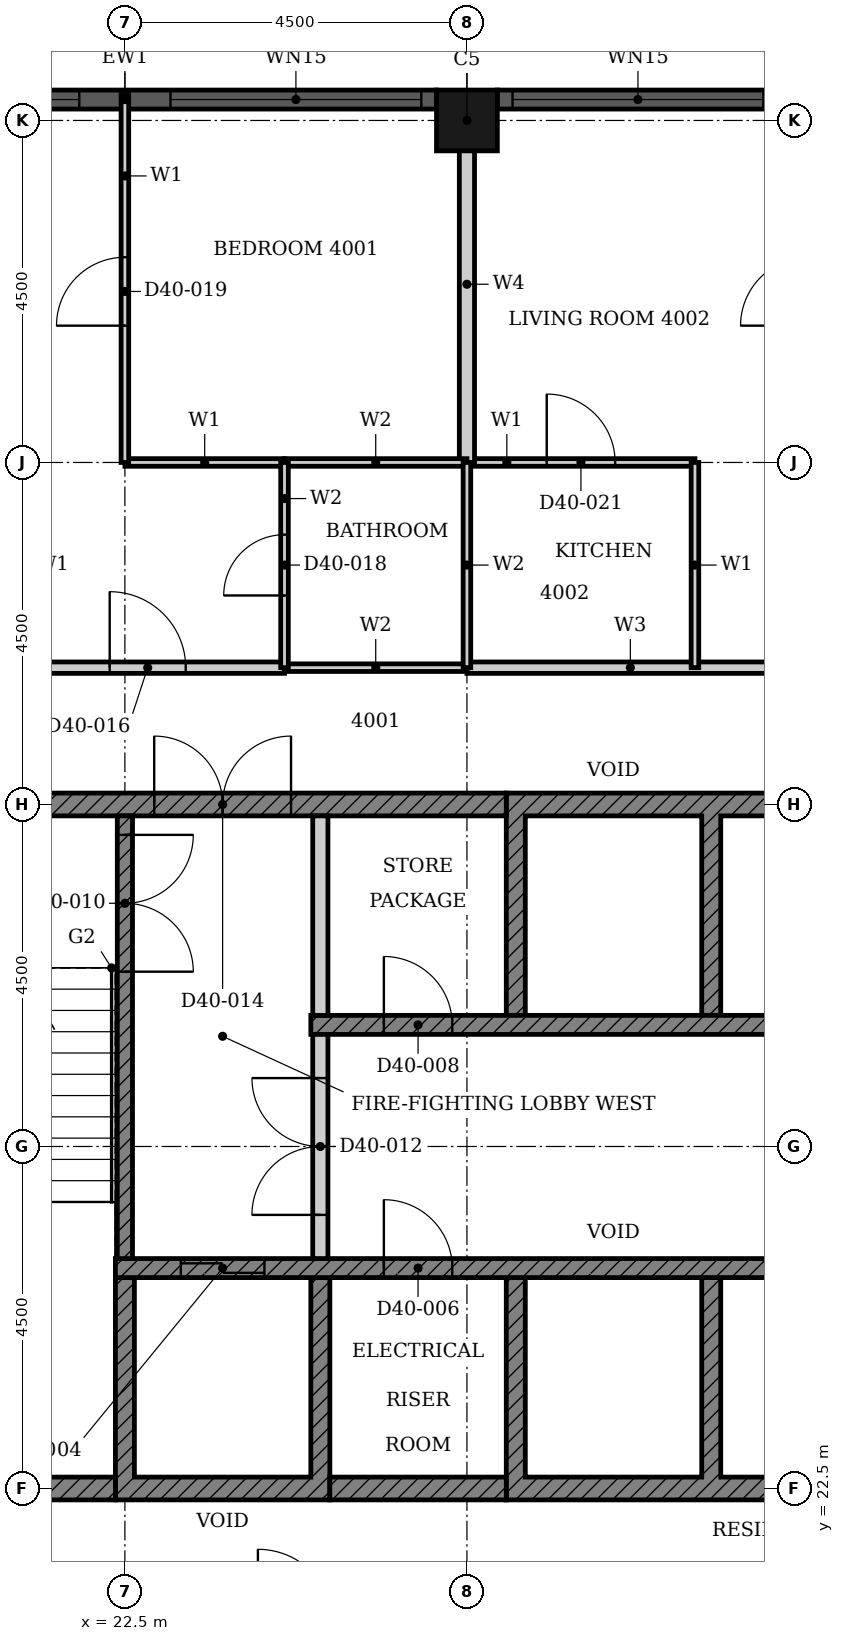
"""IFC4 building model, lengths in metres.
Left out: names, types, materials, properties, quantities, classifications, styles, units other than length and angle.
Written with IfcOpenShell. Run it as: python <this file> out.ifc"""

import sys

from ifc_helpers import new_model, si_unit, direction, frame, frame_2d, origin, origin_2d, place, context, subcontext, project, spatial, polyline, rectangle, hollow_rectangle, outline, extrude, element, fill, save


model = new_model("IFC4")
c1 = context("Model", 3, precision=1e-05, world=origin(), true_north=direction((0.0, 1.0)))
c2 = subcontext(c1, "Body", "Model", "MODEL_VIEW")
j1 = project(units=[si_unit("LENGTHUNIT", "METRE"), si_unit("PLANEANGLEUNIT", "RADIAN")], contexts=[c1])
p1 = place(None, origin())
s1 = spatial("IfcSite", under=j1, at=p1, CompositionType="ELEMENT")
p2 = place(p1, origin())
s2 = spatial("IfcBuilding", under=s1, at=p2, CompositionType="ELEMENT")
p3 = place(p2, frame((0.0, 0.0, 161.7)))
s3 = spatial("IfcBuildingStorey", under=s2, at=p3, CompositionType="ELEMENT", Elevation=161.7)
p4 = place(p3, frame((27.0, 40.5, 0.0), z_axis=(0.0, 0.0, 1.0), x_axis=(1.0, 0.0, 0.0)))
e1 = element("IfcColumn", 1, at=p4, inside=s3, PredefinedType="COLUMN", context=c2, shape_type="SweptSolid", body=[
    extrude(hollow_rectangle(XDim=0.8, YDim=0.8, WallThickness=0.025, at=origin_2d()), origin(), (0.0, 0.0, 1.0), 3.7),
])
p5 = place(p3, frame((35.6, 40.775, 0.0), z_axis=(0.0, 0.0, 1.0), x_axis=(-1.0, 0.0, 0.0)))
e2 = element("IfcWall", 2, at=p5, inside=s3, PredefinedType="SOLIDWALL", context=c2, shape_type="SweptSolid", body=[
    extrude(rectangle(XDim=8.2, YDim=0.25, at=frame_2d((4.1, 0.0))), origin(), (0.0, 0.0, 1.0), 3.7),
])
p6 = place(p5, frame((0.2, 0.0, 0.45)))
e3 = element("IfcOpeningElement", 3, at=p6, cuts=e2, PredefinedType="OPENING", context=c2, shape_type="SweptSolid", body=[
    extrude(rectangle(XDim=3.3, YDim=2.3, at=frame_2d((1.65, 1.15))), frame((0.0, 0.135, 0.0), z_axis=(0.0, -1.0, 0.0), x_axis=(1.0, 0.0, 0.0)), (0.0, 0.0, 1.0), 0.27),
])
p7 = place(p5, frame((4.7, 0.0, 0.45)))
e4 = element("IfcOpeningElement", 4, at=p7, cuts=e2, PredefinedType="OPENING", context=c2, shape_type="SweptSolid", body=[
    extrude(rectangle(XDim=3.3, YDim=2.3, at=frame_2d((1.65, 1.15))), frame((0.0, 0.135, 0.0), z_axis=(0.0, -1.0, 0.0), x_axis=(1.0, 0.0, 0.0)), (0.0, 0.0, 1.0), 0.27),
])
p8 = place(p3, frame((26.6, 40.775, 0.0), z_axis=(0.0, 0.0, 1.0), x_axis=(-1.0, 0.0, 0.0)))
e5 = element("IfcWall", 5, at=p8, inside=s3, PredefinedType="SOLIDWALL", context=c2, shape_type="SweptSolid", body=[
    extrude(rectangle(XDim=8.2, YDim=0.25, at=frame_2d((4.1, 0.0))), origin(), (0.0, 0.0, 1.0), 3.7),
])
p9 = place(p8, frame((0.2, 0.0, 0.45)))
e6 = element("IfcOpeningElement", 6, at=p9, cuts=e5, PredefinedType="OPENING", context=c2, shape_type="SweptSolid", body=[
    extrude(rectangle(XDim=3.3, YDim=2.3, at=frame_2d((1.65, 1.15))), frame((0.0, 0.135, 0.0), z_axis=(0.0, -1.0, 0.0), x_axis=(1.0, 0.0, 0.0)), (0.0, 0.0, 1.0), 0.27),
])
p10 = place(p8, frame((4.7, 0.0, 0.45)))
e7 = element("IfcOpeningElement", 7, at=p10, cuts=e5, PredefinedType="OPENING", context=c2, shape_type="SweptSolid", body=[
    extrude(rectangle(XDim=3.3, YDim=2.3, at=frame_2d((1.65, 1.15))), frame((0.0, 0.135, 0.0), z_axis=(0.0, -1.0, 0.0), x_axis=(1.0, 0.0, 0.0)), (0.0, 0.0, 1.0), 0.27),
])
p11 = place(p3, origin())
e8 = element("IfcWall", 8, at=p11, inside=s3, PredefinedType="SHEAR", context=c2, shape_type="SweptSolid", body=[
    extrude(outline(polyline([(22.375, 22.35), (25.197, 22.35), (25.197, 25.275), (24.947, 25.275), (24.947, 22.65), (22.625, 22.65), (22.625, 25.275), (22.375, 25.275), (22.375, 22.35)])), origin(), (0.0, 0.0, 1.0), 3.4),
])
p12 = place(p3, origin())
e9 = element("IfcWall", 9, at=p12, inside=s3, PredefinedType="SHEAR", context=c2, shape_type="SweptSolid", body=[
    extrude(outline(polyline([(27.518, 22.35), (32.911, 22.35), (32.911, 25.275), (32.661, 25.275), (32.661, 22.65), (30.339, 22.65), (30.339, 25.275), (30.089, 25.275), (30.089, 22.65), (27.768, 22.65), (27.768, 25.275), (27.518, 25.275), (27.518, 22.35)])), origin(), (0.0, 0.0, 1.0), 3.4),
])
p13 = place(p3, origin())
e10 = element("IfcWall", 10, at=p13, inside=s3, PredefinedType="SHEAR", context=c2, shape_type="SweptSolid", body=[
    extrude(outline(polyline([(27.518, 28.725), (27.768, 28.725), (27.768, 31.35), (30.089, 31.35), (30.089, 28.725), (30.339, 28.725), (30.339, 31.35), (32.661, 31.35), (32.661, 28.725), (32.911, 28.725), (32.911, 31.65), (27.518, 31.65), (27.518, 28.725)])), origin(), (0.0, 0.0, 1.0), 3.4),
])
p14 = place(p3, frame((18.15, 22.5, 0.0), z_axis=(0.0, 0.0, 1.0), x_axis=(1.0, 0.0, 0.0)))
e11 = element("IfcWall", 11, at=p14, inside=s3, PredefinedType="SHEAR", context=c2, shape_type="SweptSolid", body=[
    extrude(rectangle(XDim=4.225, YDim=0.3, at=frame_2d((2.113, 0.0))), origin(), (0.0, 0.0, 1.0), 3.4),
])
p15 = place(p3, frame((25.197, 22.5, 0.0), z_axis=(0.0, 0.0, 1.0), x_axis=(1.0, 0.0, 0.0)))
e12 = element("IfcWall", 12, at=p15, inside=s3, PredefinedType="SHEAR", context=c2, shape_type="SweptSolid", body=[
    extrude(rectangle(XDim=2.321, YDim=0.3, at=frame_2d((1.161, 0.0))), origin(), (0.0, 0.0, 1.0), 3.4),
])
p16 = place(p3, frame((18.15, 31.5, 0.0), z_axis=(0.0, 0.0, 1.0), x_axis=(1.0, 0.0, 0.0)))
e13 = element("IfcWall", 13, at=p16, inside=s3, PredefinedType="SHEAR", context=c2, shape_type="SweptSolid", body=[
    extrude(rectangle(XDim=9.368, YDim=0.3, at=frame_2d((4.684, 0.0))), origin(), (0.0, 0.0, 1.0), 3.4),
])
p17 = place(p16, frame((4.736, 0.0, 0.0)))
e14 = element("IfcOpeningElement", 14, at=p17, cuts=e13, PredefinedType="OPENING", context=c2, shape_type="SweptSolid", body=[
    extrude(rectangle(XDim=1.8, YDim=2.1, at=frame_2d((0.9, 1.05))), frame((0.0, 0.16, 0.0), z_axis=(0.0, -1.0, 0.0), x_axis=(1.0, 0.0, 0.0)), (0.0, 0.0, 1.0), 0.32),
])
p18 = place(p3, frame((22.375, 25.4, 0.0), z_axis=(0.0, 0.0, 1.0), x_axis=(1.0, 0.0, 0.0)))
e15 = element("IfcWall", 15, at=p18, inside=s3, PredefinedType="SHEAR", context=c2, shape_type="SweptSolid", body=[
    extrude(rectangle(XDim=15.678, YDim=0.25, at=frame_2d((7.839, 0.0))), origin(), (0.0, 0.0, 1.0), 3.4),
])
p19 = place(p18, frame((8.575, 0.0, 0.0)))
e16 = element("IfcOpeningElement", 16, at=p19, cuts=e15, PredefinedType="OPENING", context=c2, shape_type="SweptSolid", body=[
    extrude(rectangle(XDim=1.1, YDim=2.1, at=frame_2d((0.55, 1.05))), frame((0.0, 0.135, 0.0), z_axis=(0.0, -1.0, 0.0), x_axis=(1.0, 0.0, 0.0)), (0.0, 0.0, 1.0), 0.27),
])
p20 = place(p18, frame((0.861, 0.0, 0.0)))
e17 = element("IfcOpeningElement", 17, at=p20, cuts=e15, PredefinedType="OPENING", context=c2, shape_type="SweptSolid", body=[
    extrude(rectangle(XDim=1.1, YDim=2.1, at=frame_2d((0.55, 1.05))), frame((0.0, 0.135, 0.0), z_axis=(0.0, -1.0, 0.0), x_axis=(1.0, 0.0, 0.0)), (0.0, 0.0, 1.0), 0.27),
])
p21 = place(p18, frame((3.532, 0.0, 0.0)))
e18 = element("IfcOpeningElement", 18, at=p21, cuts=e15, PredefinedType="OPENING", context=c2, shape_type="SweptSolid", body=[
    extrude(rectangle(XDim=0.9, YDim=2.1, at=frame_2d((0.45, 1.05))), frame((0.0, 0.135, 0.0), z_axis=(0.0, -1.0, 0.0), x_axis=(1.0, 0.0, 0.0)), (0.0, 0.0, 1.0), 0.27),
])
p22 = place(p18, frame((12.532, 0.0, 0.0)))
e19 = element("IfcOpeningElement", 19, at=p22, cuts=e15, PredefinedType="OPENING", context=c2, shape_type="SweptSolid", body=[
    extrude(rectangle(XDim=0.9, YDim=2.1, at=frame_2d((0.45, 1.05))), frame((0.0, 0.135, 0.0), z_axis=(0.0, -1.0, 0.0), x_axis=(1.0, 0.0, 0.0)), (0.0, 0.0, 1.0), 0.27),
])
p23 = place(p3, frame((24.947, 28.6, 0.0), z_axis=(0.0, 0.0, 1.0), x_axis=(1.0, 0.0, 0.0)))
e20 = element("IfcWall", 20, at=p23, inside=s3, PredefinedType="SHEAR", context=c2, shape_type="SweptSolid", body=[
    extrude(rectangle(XDim=15.678, YDim=0.25, at=frame_2d((7.839, 0.0))), origin(), (0.0, 0.0, 1.0), 3.4),
])
p24 = place(p23, frame((6.004, 0.0, 0.0)))
e21 = element("IfcOpeningElement", 21, at=p24, cuts=e20, PredefinedType="OPENING", context=c2, shape_type="SweptSolid", body=[
    extrude(rectangle(XDim=1.1, YDim=2.1, at=frame_2d((0.55, 1.05))), frame((0.0, 0.135, 0.0), z_axis=(0.0, -1.0, 0.0), x_axis=(1.0, 0.0, 0.0)), (0.0, 0.0, 1.0), 0.27),
])
p25 = place(p23, frame((11.146, 0.0, 0.0)))
e22 = element("IfcOpeningElement", 22, at=p25, cuts=e20, PredefinedType="OPENING", context=c2, shape_type="SweptSolid", body=[
    extrude(rectangle(XDim=1.1, YDim=2.1, at=frame_2d((0.55, 1.05))), frame((0.0, 0.135, 0.0), z_axis=(0.0, -1.0, 0.0), x_axis=(1.0, 0.0, 0.0)), (0.0, 0.0, 1.0), 0.27),
])
p26 = place(p23, frame((13.718, 0.0, 0.0)))
e23 = element("IfcOpeningElement", 23, at=p26, cuts=e20, PredefinedType="OPENING", context=c2, shape_type="SweptSolid", body=[
    extrude(rectangle(XDim=1.1, YDim=2.1, at=frame_2d((0.55, 1.05))), frame((0.0, 0.135, 0.0), z_axis=(0.0, -1.0, 0.0), x_axis=(1.0, 0.0, 0.0)), (0.0, 0.0, 1.0), 0.27),
])
p27 = place(p23, frame((0.961, 0.0, 0.0)))
e24 = element("IfcOpeningElement", 24, at=p27, cuts=e20, PredefinedType="OPENING", context=c2, shape_type="SweptSolid", body=[
    extrude(rectangle(XDim=0.9, YDim=2.1, at=frame_2d((0.45, 1.05))), frame((0.0, 0.135, 0.0), z_axis=(0.0, -1.0, 0.0), x_axis=(1.0, 0.0, 0.0)), (0.0, 0.0, 1.0), 0.27),
])
p28 = place(p23, frame((8.675, 0.0, 0.0)))
e25 = element("IfcOpeningElement", 25, at=p28, cuts=e20, PredefinedType="OPENING", context=c2, shape_type="SweptSolid", body=[
    extrude(rectangle(XDim=0.9, YDim=2.1, at=frame_2d((0.45, 1.05))), frame((0.0, 0.135, 0.0), z_axis=(0.0, -1.0, 0.0), x_axis=(1.0, 0.0, 0.0)), (0.0, 0.0, 1.0), 0.27),
])
p29 = place(p3, frame((25.072, 28.725, 0.0), z_axis=(0.0, 0.0, 1.0), x_axis=(0.0, 1.0, 0.0)))
e26 = element("IfcWall", 26, at=p29, inside=s3, PredefinedType="PARTITIONING", context=c2, shape_type="SweptSolid", body=[
    extrude(rectangle(XDim=2.625, YDim=0.2, at=frame_2d((1.312, 0.0))), origin(), (0.0, 0.0, 1.0), 3.4),
])
p30 = place(p3, frame((22.5, 31.35, 0.0), z_axis=(0.0, 0.0, 1.0), x_axis=(0.0, -1.0, 0.0)))
e27 = element("IfcWall", 27, at=p30, inside=s3, PredefinedType="SHEAR", context=c2, shape_type="SweptSolid", body=[
    extrude(rectangle(XDim=5.825, YDim=0.2, at=frame_2d((2.913, 0.0))), origin(), (0.0, 0.0, 1.0), 3.4),
])
p31 = place(p30, frame((0.25, 0.0, 0.0)))
e28 = element("IfcOpeningElement", 28, at=p31, cuts=e27, PredefinedType="OPENING", context=c2, shape_type="SweptSolid", body=[
    extrude(rectangle(XDim=1.8, YDim=2.1, at=frame_2d((0.9, 1.05))), frame((0.0, 0.11, 0.0), z_axis=(0.0, -1.0, 0.0), x_axis=(1.0, 0.0, 0.0)), (0.0, 0.0, 1.0), 0.22),
])
p32 = place(p3, frame((25.072, 25.525, 0.0), z_axis=(0.0, 0.0, 1.0), x_axis=(0.0, 1.0, 0.0)))
e29 = element("IfcWall", 29, at=p32, inside=s3, PredefinedType="PARTITIONING", context=c2, shape_type="SweptSolid", body=[
    extrude(rectangle(XDim=2.95, YDim=0.2, at=frame_2d((1.475, 0.0))), origin(), (0.0, 0.0, 1.0), 3.4),
])
p33 = place(p32, frame((0.575, 0.0, 0.0)))
e30 = element("IfcOpeningElement", 30, at=p33, cuts=e29, PredefinedType="OPENING", context=c2, shape_type="SweptSolid", body=[
    extrude(rectangle(XDim=1.8, YDim=2.1, at=frame_2d((0.9, 1.05))), frame((0.0, 0.11, 0.0), z_axis=(0.0, -1.0, 0.0), x_axis=(1.0, 0.0, 0.0)), (0.0, 0.0, 1.0), 0.22),
])
p34 = place(p3, frame((18.0, 33.3, 0.0), z_axis=(0.0, 0.0, 1.0), x_axis=(1.0, 0.0, 0.0)))
e31 = element("IfcWall", 31, at=p34, inside=s3, PredefinedType="PARTITIONING", context=c2, shape_type="SweptSolid", body=[
    extrude(rectangle(XDim=6.6, YDim=0.15, at=frame_2d((3.3, 0.0))), origin(), (0.0, 0.0, 1.0), 3.4),
])
p35 = place(p34, frame((4.3, 0.0, 0.0)))
e32 = element("IfcOpeningElement", 32, at=p35, cuts=e31, PredefinedType="OPENING", context=c2, shape_type="SweptSolid", body=[
    extrude(rectangle(XDim=1.0, YDim=2.2, at=frame_2d((0.5, 1.1))), frame((0.0, 0.085, 0.0), z_axis=(0.0, -1.0, 0.0), x_axis=(1.0, 0.0, 0.0)), (0.0, 0.0, 1.0), 0.17),
])
p36 = place(p3, frame((27.0, 33.3, 0.0), z_axis=(0.0, 0.0, 1.0), x_axis=(1.0, 0.0, 0.0)))
e33 = element("IfcWall", 33, at=p36, inside=s3, PredefinedType="PARTITIONING", context=c2, shape_type="SweptSolid", body=[
    extrude(rectangle(XDim=6.6, YDim=0.15, at=frame_2d((3.3, 0.0))), origin(), (0.0, 0.0, 1.0), 3.4),
])
p37 = place(p36, frame((4.3, 0.0, 0.0)))
e34 = element("IfcOpeningElement", 34, at=p37, cuts=e33, PredefinedType="OPENING", context=c2, shape_type="SweptSolid", body=[
    extrude(rectangle(XDim=1.0, YDim=2.2, at=frame_2d((0.5, 1.1))), frame((0.0, 0.085, 0.0), z_axis=(0.0, -1.0, 0.0), x_axis=(1.0, 0.0, 0.0)), (0.0, 0.0, 1.0), 0.17),
])
p38 = place(p3, frame((22.5, 36.0, 0.0), z_axis=(0.0, 0.0, 1.0), x_axis=(1.0, 0.0, 0.0)))
e35 = element("IfcWall", 35, at=p38, inside=s3, PredefinedType="PARTITIONING", context=c2, shape_type="SweptSolid", body=[
    extrude(rectangle(XDim=2.1, YDim=0.1, at=frame_2d((1.05, 0.0))), origin(), (0.0, 0.0, 1.0), 3.4),
])
p39 = place(p3, frame((27.0, 36.0, 0.0), z_axis=(0.0, 0.0, 1.0), x_axis=(1.0, 0.0, 0.0)))
e36 = element("IfcWall", 36, at=p39, inside=s3, PredefinedType="PARTITIONING", context=c2, shape_type="SweptSolid", body=[
    extrude(rectangle(XDim=3.0, YDim=0.1, at=frame_2d((1.5, 0.0))), origin(), (0.0, 0.0, 1.0), 3.4),
])
p40 = place(p39, frame((1.05, 0.0, 0.0)))
e37 = element("IfcOpeningElement", 37, at=p40, cuts=e36, PredefinedType="OPENING", context=c2, shape_type="SweptSolid", body=[
    extrude(rectangle(XDim=0.9, YDim=2.1, at=frame_2d((0.45, 1.05))), frame((0.0, 0.06, 0.0), z_axis=(0.0, -1.0, 0.0), x_axis=(1.0, 0.0, 0.0)), (0.0, 0.0, 1.0), 0.12),
])
p41 = place(p3, frame((22.5, 36.0, 0.0), z_axis=(0.0, 0.0, 1.0), x_axis=(0.0, 1.0, 0.0)))
e38 = element("IfcWall", 38, at=p41, inside=s3, PredefinedType="PARTITIONING", context=c2, shape_type="SweptSolid", body=[
    extrude(rectangle(XDim=4.84, YDim=0.1, at=frame_2d((2.42, 0.0))), origin(), (0.0, 0.0, 1.0), 3.4),
])
p42 = place(p41, frame((1.8, 0.0, 0.0)))
e39 = element("IfcOpeningElement", 39, at=p42, cuts=e38, PredefinedType="OPENING", context=c2, shape_type="SweptSolid", body=[
    extrude(rectangle(XDim=0.9, YDim=2.1, at=frame_2d((0.45, 1.05))), frame((0.0, 0.06, 0.0), z_axis=(0.0, -1.0, 0.0), x_axis=(1.0, 0.0, 0.0)), (0.0, 0.0, 1.0), 0.12),
])
p43 = place(p3, frame((30.0, 33.3, 0.0), z_axis=(0.0, 0.0, 1.0), x_axis=(0.0, 1.0, 0.0)))
e40 = element("IfcWall", 40, at=p43, inside=s3, PredefinedType="PARTITIONING", context=c2, shape_type="SweptSolid", body=[
    extrude(rectangle(XDim=2.7, YDim=0.1, at=frame_2d((1.35, 0.0))), origin(), (0.0, 0.0, 1.0), 3.4),
])
p44 = place(p3, frame((27.0, 36.0, 0.0), z_axis=(0.0, 0.0, 1.0), x_axis=(0.0, 1.0, 0.0)))
e41 = element("IfcWall", 41, at=p44, inside=s3, PredefinedType="PARTITIONING", context=c2, shape_type="SweptSolid", body=[
    extrude(rectangle(XDim=4.69, YDim=0.2, at=frame_2d((2.345, 0.0))), origin(), (0.0, 0.0, 1.0), 3.4),
])
for number, where, z_axis, x_axis in (
    (42, (24.6, 33.3, 0.0), (0.0, 0.0, 1.0), (1.0, 0.0, 0.0)),
    (43, (24.6, 36.0, 0.0), (0.0, 0.0, 1.0), (1.0, 0.0, 0.0)),
):
    element("IfcWall", number, at=place(p3, frame(where, z_axis=z_axis, x_axis=x_axis)), inside=s3, PredefinedType="PARTITIONING", context=c2, shape_type="SweptSolid", body=[
        extrude(rectangle(XDim=2.4, YDim=0.1, at=frame_2d((1.2, 0.0))), origin(), (0.0, 0.0, 1.0), 3.4),
    ])
p45 = place(p3, frame((24.6, 33.3, 0.0), z_axis=(0.0, 0.0, 1.0), x_axis=(0.0, 1.0, 0.0)))
e44 = element("IfcWall", 44, at=p45, inside=s3, PredefinedType="PARTITIONING", context=c2, shape_type="SweptSolid", body=[
    extrude(rectangle(XDim=2.7, YDim=0.1, at=frame_2d((1.35, 0.0))), origin(), (0.0, 0.0, 1.0), 3.4),
])
p46 = place(p45, frame((0.95, 0.0, 0.0)))
e45 = element("IfcOpeningElement", 45, at=p46, cuts=e44, PredefinedType="OPENING", context=c2, shape_type="SweptSolid", body=[
    extrude(rectangle(XDim=0.8, YDim=2.1, at=frame_2d((0.4, 1.05))), frame((0.0, 0.06, 0.0), z_axis=(0.0, -1.0, 0.0), x_axis=(1.0, 0.0, 0.0)), (0.0, 0.0, 1.0), 0.12),
])
p47 = place(p3, frame((27.0, 33.3, 0.0), z_axis=(0.0, 0.0, 1.0), x_axis=(0.0, 1.0, 0.0)))
e46 = element("IfcWall", 46, at=p47, inside=s3, PredefinedType="PARTITIONING", context=c2, shape_type="SweptSolid", body=[
    extrude(rectangle(XDim=2.7, YDim=0.1, at=frame_2d((1.35, 0.0))), origin(), (0.0, 0.0, 1.0), 3.4),
])
p48 = place(p7, origin())
e47 = element("IfcWindow", 47, at=p48, inside=s3, PartitioningType="SINGLE_PANEL", PredefinedType="WINDOW", context=c2, shape_type="SweptSolid", body=[
    extrude(rectangle(XDim=3.3, YDim=2.3, at=frame_2d((1.65, 1.15))), frame((0.0, 0.03, 0.0), z_axis=(0.0, -1.0, 0.0), x_axis=(1.0, 0.0, 0.0)), (0.0, 0.0, 1.0), 0.06),
])
fill(e4, e47)
p49 = place(p9, origin())
e48 = element("IfcWindow", 48, at=p49, inside=s3, PartitioningType="SINGLE_PANEL", PredefinedType="WINDOW", context=c2, shape_type="SweptSolid", body=[
    extrude(rectangle(XDim=3.3, YDim=2.3, at=frame_2d((1.65, 1.15))), frame((0.0, 0.03, 0.0), z_axis=(0.0, -1.0, 0.0), x_axis=(1.0, 0.0, 0.0)), (0.0, 0.0, 1.0), 0.06),
])
fill(e6, e48)
p50 = place(p10, origin())
e49 = element("IfcWindow", 49, at=p50, inside=s3, PartitioningType="SINGLE_PANEL", PredefinedType="WINDOW", context=c2, shape_type="SweptSolid", body=[
    extrude(rectangle(XDim=3.3, YDim=2.3, at=frame_2d((1.65, 1.15))), frame((0.0, 0.03, 0.0), z_axis=(0.0, -1.0, 0.0), x_axis=(1.0, 0.0, 0.0)), (0.0, 0.0, 1.0), 0.06),
])
fill(e7, e49)
p51 = place(p20, origin())
e50 = element("IfcDoor", 50, at=p51, inside=s3, OperationType="DOUBLE_DOOR_SLIDING", PredefinedType="DOOR", context=c2, shape_type="SweptSolid", body=[
    extrude(rectangle(XDim=1.1, YDim=2.1, at=frame_2d((0.55, 1.05))), frame((0.0, 0.025, 0.0), z_axis=(0.0, -1.0, 0.0), x_axis=(1.0, 0.0, 0.0)), (0.0, 0.0, 1.0), 0.05),
])
fill(e17, e50)
p52 = place(p21, origin())
e51 = element("IfcDoor", 51, at=p52, inside=s3, OperationType="SINGLE_SWING_LEFT", PredefinedType="DOOR", context=c2, shape_type="SweptSolid", body=[
    extrude(rectangle(XDim=0.9, YDim=2.1, at=frame_2d((0.45, 1.05))), frame((0.0, 0.025, 0.0), z_axis=(0.0, -1.0, 0.0), x_axis=(1.0, 0.0, 0.0)), (0.0, 0.0, 1.0), 0.05),
])
fill(e18, e51)
p53 = place(p27, origin())
e52 = element("IfcDoor", 52, at=p53, inside=s3, OperationType="SINGLE_SWING_LEFT", PredefinedType="DOOR", context=c2, shape_type="SweptSolid", body=[
    extrude(rectangle(XDim=0.9, YDim=2.1, at=frame_2d((0.45, 1.05))), frame((0.0, 0.025, 0.0), z_axis=(0.0, -1.0, 0.0), x_axis=(1.0, 0.0, 0.0)), (0.0, 0.0, 1.0), 0.05),
])
fill(e24, e52)
p54 = place(p31, origin())
e53 = element("IfcDoor", 53, at=p54, inside=s3, OperationType="DOUBLE_DOOR_SINGLE_SWING", PredefinedType="DOOR", context=c2, shape_type="SweptSolid", body=[
    extrude(rectangle(XDim=1.8, YDim=2.1, at=frame_2d((0.9, 1.05))), frame((0.0, 0.025, 0.0), z_axis=(0.0, -1.0, 0.0), x_axis=(1.0, 0.0, 0.0)), (0.0, 0.0, 1.0), 0.05),
])
fill(e28, e53)
p55 = place(p33, origin())
e54 = element("IfcDoor", 54, at=p55, inside=s3, OperationType="DOUBLE_DOOR_SINGLE_SWING", PredefinedType="DOOR", context=c2, shape_type="SweptSolid", body=[
    extrude(rectangle(XDim=1.8, YDim=2.1, at=frame_2d((0.9, 1.05))), frame((0.0, 0.025, 0.0), z_axis=(0.0, -1.0, 0.0), x_axis=(1.0, 0.0, 0.0)), (0.0, 0.0, 1.0), 0.05),
])
fill(e30, e54)
p56 = place(p17, origin())
e55 = element("IfcDoor", 55, at=p56, inside=s3, OperationType="DOUBLE_DOOR_SINGLE_SWING", PredefinedType="DOOR", context=c2, shape_type="SweptSolid", body=[
    extrude(rectangle(XDim=1.8, YDim=2.1, at=frame_2d((0.9, 1.05))), frame((0.0, 0.025, 0.0), z_axis=(0.0, -1.0, 0.0), x_axis=(1.0, 0.0, 0.0)), (0.0, 0.0, 1.0), 0.05),
])
fill(e14, e55)
p57 = place(p35, origin())
e56 = element("IfcDoor", 56, at=p57, inside=s3, OperationType="SINGLE_SWING_RIGHT", PredefinedType="DOOR", context=c2, shape_type="SweptSolid", body=[
    extrude(rectangle(XDim=1.0, YDim=2.2, at=frame_2d((0.5, 1.1))), frame((0.0, 0.025, 0.0), z_axis=(0.0, -1.0, 0.0), x_axis=(1.0, 0.0, 0.0)), (0.0, 0.0, 1.0), 0.05),
])
fill(e32, e56)
p58 = place(p46, origin())
e57 = element("IfcDoor", 57, at=p58, inside=s3, OperationType="SINGLE_SWING_LEFT", PredefinedType="DOOR", context=c2, shape_type="SweptSolid", body=[
    extrude(rectangle(XDim=0.8, YDim=2.1, at=frame_2d((0.4, 1.05))), frame((0.0, 0.025, 0.0), z_axis=(0.0, -1.0, 0.0), x_axis=(1.0, 0.0, 0.0)), (0.0, 0.0, 1.0), 0.05),
])
fill(e45, e57)
p59 = place(p42, origin())
e58 = element("IfcDoor", 58, at=p59, inside=s3, OperationType="SINGLE_SWING_LEFT", PredefinedType="DOOR", context=c2, shape_type="SweptSolid", body=[
    extrude(rectangle(XDim=0.9, YDim=2.1, at=frame_2d((0.45, 1.05))), frame((0.0, 0.025, 0.0), z_axis=(0.0, -1.0, 0.0), x_axis=(1.0, 0.0, 0.0)), (0.0, 0.0, 1.0), 0.05),
])
fill(e39, e58)
p60 = place(p40, origin())
e59 = element("IfcDoor", 59, at=p60, inside=s3, OperationType="SINGLE_SWING_LEFT", PredefinedType="DOOR", context=c2, shape_type="SweptSolid", body=[
    extrude(rectangle(XDim=0.9, YDim=2.1, at=frame_2d((0.45, 1.05))), frame((0.0, 0.025, 0.0), z_axis=(0.0, -1.0, 0.0), x_axis=(1.0, 0.0, 0.0)), (0.0, 0.0, 1.0), 0.05),
])
fill(e37, e59)
save(model, sys.argv[1])
